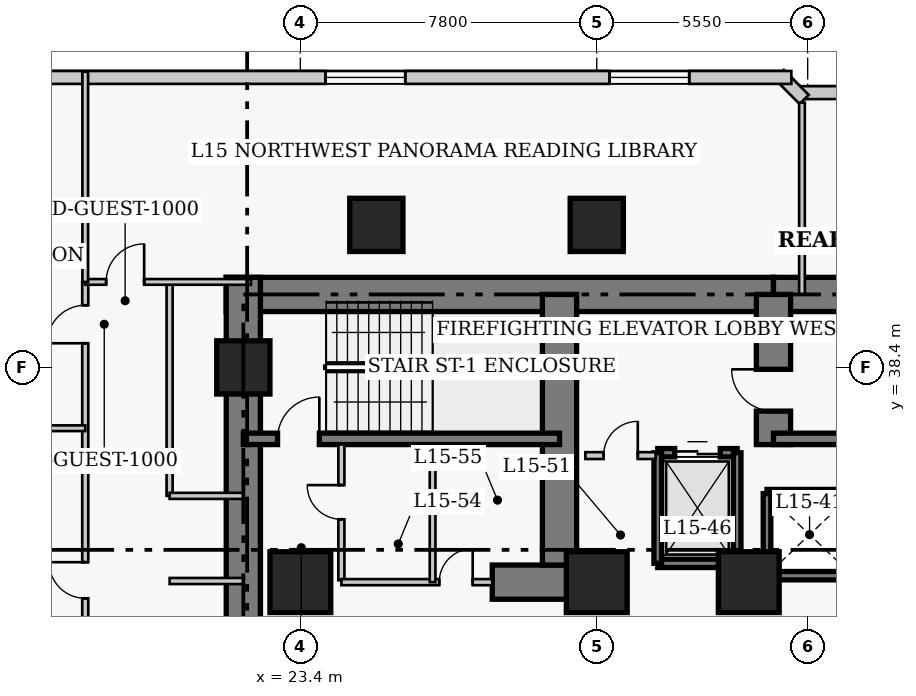
"""IFC4 building model, lengths in metres.
Left out: names, types, materials, properties, quantities, classifications, styles, units other than length and angle.
Written with IfcOpenShell. Run it as: python <this file> out.ifc"""

import sys

from ifc_helpers import new_model, si_unit, direction, frame, frame_2d, origin, origin_2d, place, context, subcontext, project, spatial, rectangle, extrude, element, fill, save


model = new_model("IFC4")
c1 = context("Model", 3, precision=1e-05, world=origin(), true_north=direction((0.0, 1.0)))
c2 = subcontext(c1, "Body", "Model", "MODEL_VIEW")
j1 = project(units=[si_unit("LENGTHUNIT", "METRE"), si_unit("PLANEANGLEUNIT", "RADIAN")], contexts=[c1])
p1 = place(None, origin())
s1 = spatial("IfcSite", under=j1, at=p1, CompositionType="ELEMENT")
p2 = place(p1, origin())
s2 = spatial("IfcBuilding", under=s1, at=p2, CompositionType="ELEMENT")
p3 = place(p2, frame((0.0, 0.0, 64.0)))
s3 = spatial("IfcBuildingStorey", under=s2, at=p3, CompositionType="ELEMENT", Elevation=64.0)
p4 = place(p3, frame((21.45, 40.32, 0.0), z_axis=(0.0, 0.0, 1.0), x_axis=(1.0, 0.0, 0.0)))
e1 = element("IfcWall", 1, at=p4, inside=s3, PredefinedType="SHEAR", context=c2, shape_type="SweptSolid", body=[
    extrude(rectangle(XDim=14.4, YDim=0.9, at=frame_2d((7.2, 0.0))), origin(), (0.0, 0.0, 1.0), 3.8),
])
p5 = place(p3, frame((35.85, 40.32, 0.0), z_axis=(0.0, 0.0, 1.0), x_axis=(1.0, 0.0, 0.0)))
e2 = element("IfcWall", 2, at=p5, inside=s3, PredefinedType="SHEAR", context=c2, shape_type="SweptSolid", body=[
    extrude(rectangle(XDim=12.6, YDim=0.9, at=frame_2d((6.3, 0.0))), origin(), (0.0, 0.0, 1.0), 3.8),
])
p6 = place(p3, frame((21.9, 27.05, 0.0), z_axis=(0.0, 0.0, 1.0), x_axis=(0.0, 1.0, 0.0)))
e3 = element("IfcWall", 3, at=p6, inside=s3, PredefinedType="SHEAR", context=c2, shape_type="SweptSolid", body=[
    extrude(rectangle(XDim=13.72, YDim=0.9, at=frame_2d((6.86, 0.0))), origin(), (0.0, 0.0, 1.0), 3.8),
])
p7 = place(p3, frame((28.45, 32.75, 0.0), z_axis=(0.0, 0.0, 1.0), x_axis=(1.0, 0.0, 0.0)))
e4 = element("IfcWall", 4, at=p7, inside=s3, PredefinedType="SHEAR", context=c2, shape_type="SweptSolid", body=[
    extrude(rectangle(XDim=2.4, YDim=0.9, at=frame_2d((1.2, 0.0))), origin(), (0.0, 0.0, 1.0), 3.8),
])
p8 = place(p3, frame((30.22, 33.2, 0.0), z_axis=(0.0, 0.0, 1.0), x_axis=(0.0, 1.0, 0.0)))
e5 = element("IfcWall", 5, at=p8, inside=s3, PredefinedType="SHEAR", context=c2, shape_type="SweptSolid", body=[
    extrude(rectangle(XDim=7.12, YDim=0.9, at=frame_2d((3.56, 0.0))), origin(), (0.0, 0.0, 1.0), 3.8),
])
p9 = place(p3, frame((35.85, 36.37, 0.0), z_axis=(0.0, 0.0, 1.0), x_axis=(0.0, 1.0, 0.0)))
e6 = element("IfcWall", 6, at=p9, inside=s3, PredefinedType="SHEAR", context=c2, shape_type="SweptSolid", body=[
    extrude(rectangle(XDim=3.95, YDim=0.9, at=frame_2d((1.975, 0.0))), origin(), (0.0, 0.0, 1.0), 3.8),
])
p10 = place(p9, frame((0.88, 0.0, 0.0)))
e7 = element("IfcOpeningElement", 7, at=p10, cuts=e6, PredefinedType="OPENING", context=c2, shape_type="SweptSolid", body=[
    extrude(rectangle(XDim=1.1, YDim=2.15, at=frame_2d((0.55, 1.075))), frame((0.0, 0.46, 0.0), z_axis=(0.0, -1.0, 0.0), x_axis=(1.0, 0.0, 0.0)), (0.0, 0.0, 1.0), 0.92),
])
p11 = place(p3, frame((21.9, 36.52, 0.0), z_axis=(0.0, 0.0, 1.0), x_axis=(1.0, 0.0, 0.0)))
e8 = element("IfcWall", 8, at=p11, inside=s3, PredefinedType="SHEAR", context=c2, shape_type="SweptSolid", body=[
    extrude(rectangle(XDim=8.32, YDim=0.3, at=frame_2d((4.16, 0.0))), origin(), (0.0, 0.0, 1.0), 3.8),
])
p12 = place(p11, frame((0.9, 0.0, 0.0)))
e9 = element("IfcOpeningElement", 9, at=p12, cuts=e8, PredefinedType="OPENING", context=c2, shape_type="SweptSolid", body=[
    extrude(rectangle(XDim=1.1, YDim=2.15, at=frame_2d((0.55, 1.075))), frame((0.0, 0.16, 0.0), z_axis=(0.0, -1.0, 0.0), x_axis=(1.0, 0.0, 0.0)), (0.0, 0.0, 1.0), 0.32),
])
p13 = place(p3, frame((35.85, 36.52, 0.0), z_axis=(0.0, 0.0, 1.0), x_axis=(1.0, 0.0, 0.0)))
e10 = element("IfcWall", 10, at=p13, inside=s3, PredefinedType="SHEAR", context=c2, shape_type="SweptSolid", body=[
    extrude(rectangle(XDim=8.33, YDim=0.3, at=frame_2d((4.165, 0.0))), origin(), (0.0, 0.0, 1.0), 3.8),
])
p14 = place(p3, frame((21.9, 38.4, 0.0), z_axis=(0.0, 0.0, 1.0), x_axis=(1.0, 0.0, 0.0)))
e11 = element("IfcColumn", 11, at=p14, inside=s3, PredefinedType="COLUMN", context=c2, shape_type="SweptSolid", body=[
    extrude(rectangle(XDim=1.4, YDim=1.4, at=origin_2d()), origin(), (0.0, 0.0, 1.0), 3.8),
])
for number, where, z_axis, x_axis in (
    (12, (23.4, 32.75, 0.0), (0.0, 0.0, 1.0), (1.0, 0.0, 0.0)),
    (13, (31.2, 32.75, 0.0), (0.0, 0.0, 1.0), (1.0, 0.0, 0.0)),
    (14, (35.2, 32.75, 0.0), (0.0, 0.0, 1.0), (1.0, 0.0, 0.0)),
):
    element("IfcColumn", number, at=place(p3, frame(where, z_axis=z_axis, x_axis=x_axis)), inside=s3, PredefinedType="COLUMN", context=c2, shape_type="SweptSolid", body=[
        extrude(rectangle(XDim=1.6, YDim=1.6, at=origin_2d()), origin(), (0.0, 0.0, 1.0), 3.8),
    ])
for number, where, z_axis, x_axis in (
    (15, (25.4, 42.15, 0.0), (0.0, 0.0, 1.0), (1.0, 0.0, 0.0)),
    (16, (31.2, 42.15, 0.0), (0.0, 0.0, 1.0), (1.0, 0.0, 0.0)),
):
    element("IfcColumn", number, at=place(p3, frame(where, z_axis=z_axis, x_axis=x_axis)), inside=s3, PredefinedType="COLUMN", context=c2, shape_type="SweptSolid", body=[
        extrude(rectangle(XDim=1.4, YDim=1.4, at=origin_2d()), origin(), (0.0, 0.0, 1.0), 3.8),
    ])
p15 = place(p3, frame((41.42, 45.63, 0.0), z_axis=(0.0, 0.0, 1.0), x_axis=(-1.0, 0.0, 0.0)))
e17 = element("IfcWall", 17, at=p15, inside=s3, PredefinedType="SOLIDWALL", context=c2, shape_type="SweptSolid", body=[
    extrude(rectangle(XDim=4.84, YDim=0.34, at=frame_2d((2.42, 0.0))), origin(), (0.0, 0.0, 1.0), 3.54),
])
p16 = place(p15, frame((1.37, 0.0, 0.85)))
e18 = element("IfcOpeningElement", 18, at=p16, cuts=e17, PredefinedType="OPENING", context=c2, shape_type="SweptSolid", body=[
    extrude(rectangle(XDim=2.1, YDim=1.85, at=frame_2d((1.05, 0.925))), frame((0.0, 0.18, 0.0), z_axis=(0.0, -1.0, 0.0), x_axis=(1.0, 0.0, 0.0)), (0.0, 0.0, 1.0), 0.36),
])
p17 = place(p3, frame((36.658, 45.451, 0.0), z_axis=(0.0, 0.0, 1.0), x_axis=(-0.707106781187, 0.707106781187, 0.0)))
e19 = element("IfcWall", 19, at=p17, inside=s3, PredefinedType="SOLIDWALL", context=c2, shape_type="SweptSolid", body=[
    extrude(rectangle(XDim=0.929, YDim=0.34, at=frame_2d((0.464, 0.0))), origin(), (0.0, 0.0, 1.0), 3.54),
])
p18 = place(p3, frame((36.32, 46.03, 0.0), z_axis=(0.0, 0.0, 1.0), x_axis=(-1.0, 0.0, 0.0)))
e20 = element("IfcWall", 20, at=p18, inside=s3, PredefinedType="SOLIDWALL", context=c2, shape_type="SweptSolid", body=[
    extrude(rectangle(XDim=29.89, YDim=0.34, at=frame_2d((14.945, 0.0))), origin(), (0.0, 0.0, 1.0), 3.54),
])
p19 = place(p18, frame((2.686, 0.0, 0.85)))
e21 = element("IfcOpeningElement", 21, at=p19, cuts=e20, PredefinedType="OPENING", context=c2, shape_type="SweptSolid", body=[
    extrude(rectangle(XDim=2.1, YDim=1.85, at=frame_2d((1.05, 0.925))), frame((0.0, 0.18, 0.0), z_axis=(0.0, -1.0, 0.0), x_axis=(1.0, 0.0, 0.0)), (0.0, 0.0, 1.0), 0.36),
])
p20 = place(p18, frame((10.159, 0.0, 0.85)))
e22 = element("IfcOpeningElement", 22, at=p20, cuts=e20, PredefinedType="OPENING", context=c2, shape_type="SweptSolid", body=[
    extrude(rectangle(XDim=2.1, YDim=1.85, at=frame_2d((1.05, 0.925))), frame((0.0, 0.18, 0.0), z_axis=(0.0, -1.0, 0.0), x_axis=(1.0, 0.0, 0.0)), (0.0, 0.0, 1.0), 0.36),
])
p21 = place(p18, frame((25.104, 0.0, 0.85)))
e23 = element("IfcOpeningElement", 23, at=p21, cuts=e20, PredefinedType="OPENING", context=c2, shape_type="SweptSolid", body=[
    extrude(rectangle(XDim=2.1, YDim=1.85, at=frame_2d((1.05, 0.925))), frame((0.0, 0.18, 0.0), z_axis=(0.0, -1.0, 0.0), x_axis=(1.0, 0.0, 0.0)), (0.0, 0.0, 1.0), 0.36),
])
for number, where, z_axis, x_axis in (
    (24, (35.68, 35.08, 0.0), (0.0, 0.0, 1.0), (1.0, 0.0, 0.0)),
    (25, (35.68, 32.92, 0.0), (0.0, 0.0, 1.0), (1.0, 0.0, 0.0)),
):
    element("IfcWall", number, at=place(p3, frame(where, z_axis=z_axis, x_axis=x_axis)), inside=s3, PredefinedType="SHEAR", context=c2, shape_type="SweptSolid", body=[
        extrude(rectangle(XDim=2.32, YDim=0.22, at=frame_2d((1.16, 0.0))), origin(), (0.0, 0.0, 1.0), 3.8),
    ])
p22 = place(p3, frame((35.68, 32.92, 0.0), z_axis=(0.0, 0.0, 1.0), x_axis=(0.0, 1.0, 0.0)))
e26 = element("IfcWall", 26, at=p22, inside=s3, PredefinedType="SHEAR", context=c2, shape_type="SweptSolid", body=[
    extrude(rectangle(XDim=2.16, YDim=0.2, at=frame_2d((1.08, 0.0))), origin(), (0.0, 0.0, 1.0), 3.8),
])
p23 = place(p3, frame((32.805, 36.155, 0.0), z_axis=(0.0, 0.0, 1.0), x_axis=(1.0, 0.0, 0.0)))
e27 = element("IfcWall", 27, at=p23, inside=s3, PredefinedType="SHEAR", context=c2, shape_type="SweptSolid", body=[
    extrude(rectangle(XDim=2.09, YDim=0.22, at=frame_2d((1.045, 0.0))), origin(), (0.0, 0.0, 1.0), 3.8),
])
p24 = place(p23, frame((0.445, 0.0, 0.0)))
e28 = element("IfcOpeningElement", 28, at=p24, cuts=e27, PredefinedType="OPENING", context=c2, shape_type="SweptSolid", body=[
    extrude(rectangle(XDim=1.2, YDim=2.15, at=frame_2d((0.6, 1.075))), frame((0.0, 0.12, 0.0), z_axis=(0.0, -1.0, 0.0), x_axis=(1.0, 0.0, 0.0)), (0.0, 0.0, 1.0), 0.24),
])
p25 = place(p3, frame((32.805, 33.245, 0.0), z_axis=(0.0, 0.0, 1.0), x_axis=(1.0, 0.0, 0.0)))
e29 = element("IfcWall", 29, at=p25, inside=s3, PredefinedType="SHEAR", context=c2, shape_type="SweptSolid", body=[
    extrude(rectangle(XDim=2.09, YDim=0.22, at=frame_2d((1.045, 0.0))), origin(), (0.0, 0.0, 1.0), 3.8),
])
for number, where, z_axis, x_axis in (
    (30, (32.805, 33.245, 0.0), (0.0, 0.0, 1.0), (0.0, 1.0, 0.0)),
    (31, (34.895, 33.245, 0.0), (0.0, 0.0, 1.0), (0.0, 1.0, 0.0)),
):
    element("IfcWall", number, at=place(p3, frame(where, z_axis=z_axis, x_axis=x_axis)), inside=s3, PredefinedType="SHEAR", context=c2, shape_type="SweptSolid", body=[
        extrude(rectangle(XDim=2.91, YDim=0.2, at=frame_2d((1.455, 0.0))), origin(), (0.0, 0.0, 1.0), 3.8),
    ])
p26 = place(p3, frame((30.9, 36.08, 0.0), z_axis=(0.0, 0.0, 1.0), x_axis=(1.0, 0.0, 0.0)))
e32 = element("IfcWall", 32, at=p26, inside=s3, PredefinedType="PARTITIONING", context=c2, shape_type="SweptSolid", body=[
    extrude(rectangle(XDim=1.85, YDim=0.18, at=frame_2d((0.925, 0.0))), origin(), (0.0, 0.0, 1.0), 3.54),
])
p27 = place(p26, frame((0.48, 0.0, 0.0)))
e33 = element("IfcOpeningElement", 33, at=p27, cuts=e32, PredefinedType="OPENING", context=c2, shape_type="SweptSolid", body=[
    extrude(rectangle(XDim=0.9, YDim=2.15, at=frame_2d((0.45, 1.075))), frame((0.0, 0.1, 0.0), z_axis=(0.0, -1.0, 0.0), x_axis=(1.0, 0.0, 0.0)), (0.0, 0.0, 1.0), 0.2),
])
p28 = place(p3, frame((24.48, 32.8, 0.0), z_axis=(0.0, 0.0, 1.0), x_axis=(0.0, 1.0, 0.0)))
e34 = element("IfcWall", 34, at=p28, inside=s3, PredefinedType="PARTITIONING", context=c2, shape_type="SweptSolid", body=[
    extrude(rectangle(XDim=3.57, YDim=0.16, at=frame_2d((1.785, 0.0))), origin(), (0.0, 0.0, 1.0), 3.54),
])
p29 = place(p28, frame((1.604, 0.0, 0.0)))
e35 = element("IfcOpeningElement", 35, at=p29, cuts=e34, PredefinedType="OPENING", context=c2, shape_type="SweptSolid", body=[
    extrude(rectangle(XDim=0.9, YDim=2.1, at=frame_2d((0.45, 1.05))), frame((0.0, 0.09, 0.0), z_axis=(0.0, -1.0, 0.0), x_axis=(1.0, 0.0, 0.0)), (0.0, 0.0, 1.0), 0.18),
])
p30 = place(p3, frame((24.48, 32.75, 0.0), z_axis=(0.0, 0.0, 1.0), x_axis=(1.0, 0.0, 0.0)))
e36 = element("IfcWall", 36, at=p30, inside=s3, PredefinedType="PARTITIONING", context=c2, shape_type="SweptSolid", body=[
    extrude(rectangle(XDim=3.97, YDim=0.16, at=frame_2d((1.985, 0.0))), origin(), (0.0, 0.0, 1.0), 3.54),
])
p31 = place(p30, frame((2.575, 0.0, 0.0)))
e37 = element("IfcOpeningElement", 37, at=p31, cuts=e36, PredefinedType="OPENING", context=c2, shape_type="SweptSolid", body=[
    extrude(rectangle(XDim=0.88, YDim=2.05, at=frame_2d((0.44, 1.025))), frame((0.0, 0.09, 0.0), z_axis=(0.0, -1.0, 0.0), x_axis=(1.0, 0.0, 0.0)), (0.0, 0.0, 1.0), 0.18),
])
p32 = place(p3, frame((26.88, 32.75, 0.0), z_axis=(0.0, 0.0, 1.0), x_axis=(0.0, 1.0, 0.0)))
e38 = element("IfcWall", 38, at=p32, inside=s3, PredefinedType="PARTITIONING", context=c2, shape_type="SweptSolid", body=[
    extrude(rectangle(XDim=3.62, YDim=0.15, at=frame_2d((1.81, 0.0))), origin(), (0.0, 0.0, 1.0), 3.54),
])
p33 = place(p3, frame((17.74, 5.05, 0.0), z_axis=(0.0, 0.0, 1.0), x_axis=(0.0, 1.0, 0.0)))
e39 = element("IfcWall", 39, at=p33, inside=s3, PredefinedType="PARTITIONING", context=c2, shape_type="SweptSolid", body=[
    extrude(rectangle(XDim=35.6, YDim=0.16, at=frame_2d((17.8, 0.0))), origin(), (0.0, 0.0, 1.0), 3.54),
])
p34 = place(p33, frame((2.6, 0.0, 0.0)))
e40 = element("IfcOpeningElement", 40, at=p34, cuts=e39, PredefinedType="OPENING", context=c2, shape_type="SweptSolid", body=[
    extrude(rectangle(XDim=0.95, YDim=2.1, at=frame_2d((0.475, 1.05))), frame((0.0, 0.09, 0.0), z_axis=(0.0, -1.0, 0.0), x_axis=(1.0, 0.0, 0.0)), (0.0, 0.0, 1.0), 0.18),
])
p35 = place(p33, frame((10.075, 0.0, 0.0)))
e41 = element("IfcOpeningElement", 41, at=p35, cuts=e39, PredefinedType="OPENING", context=c2, shape_type="SweptSolid", body=[
    extrude(rectangle(XDim=0.95, YDim=2.1, at=frame_2d((0.475, 1.05))), frame((0.0, 0.09, 0.0), z_axis=(0.0, -1.0, 0.0), x_axis=(1.0, 0.0, 0.0)), (0.0, 0.0, 1.0), 0.18),
])
p36 = place(p33, frame((18.875, 0.0, 0.0)))
e42 = element("IfcOpeningElement", 42, at=p36, cuts=e39, PredefinedType="OPENING", context=c2, shape_type="SweptSolid", body=[
    extrude(rectangle(XDim=0.95, YDim=2.1, at=frame_2d((0.475, 1.05))), frame((0.0, 0.09, 0.0), z_axis=(0.0, -1.0, 0.0), x_axis=(1.0, 0.0, 0.0)), (0.0, 0.0, 1.0), 0.18),
])
p37 = place(p33, frame((27.275, 0.0, 0.0)))
e43 = element("IfcOpeningElement", 43, at=p37, cuts=e39, PredefinedType="OPENING", context=c2, shape_type="SweptSolid", body=[
    extrude(rectangle(XDim=0.95, YDim=2.1, at=frame_2d((0.475, 1.05))), frame((0.0, 0.09, 0.0), z_axis=(0.0, -1.0, 0.0), x_axis=(1.0, 0.0, 0.0)), (0.0, 0.0, 1.0), 0.18),
])
p38 = place(p33, frame((33.986, 0.0, 0.0)))
e44 = element("IfcOpeningElement", 44, at=p38, cuts=e39, PredefinedType="OPENING", context=c2, shape_type="SweptSolid", body=[
    extrude(rectangle(XDim=1.0, YDim=2.15, at=frame_2d((0.5, 1.075))), frame((0.0, 0.09, 0.0), z_axis=(0.0, -1.0, 0.0), x_axis=(1.0, 0.0, 0.0)), (0.0, 0.0, 1.0), 0.18),
])
p39 = place(p3, frame((19.96, 35.02, 0.0), z_axis=(0.0, 0.0, 1.0), x_axis=(0.0, 1.0, 0.0)))
e45 = element("IfcWall", 45, at=p39, inside=s3, PredefinedType="PARTITIONING", context=c2, shape_type="SweptSolid", body=[
    extrude(rectangle(XDim=5.63, YDim=0.16, at=frame_2d((2.815, 0.0))), origin(), (0.0, 0.0, 1.0), 3.54),
])
for number, where, z_axis, x_axis in (
    (46, (19.96, 35.02, 0.0), (0.0, 0.0, 1.0), (1.0, 0.0, 0.0)),
    (47, (19.96, 32.78, 0.0), (0.0, 0.0, 1.0), (1.0, 0.0, 0.0)),
):
    element("IfcWall", number, at=place(p3, frame(where, z_axis=z_axis, x_axis=x_axis)), inside=s3, PredefinedType="PARTITIONING", context=c2, shape_type="SweptSolid", body=[
        extrude(rectangle(XDim=1.94, YDim=0.16, at=frame_2d((0.97, 0.0))), origin(), (0.0, 0.0, 1.0), 3.54),
    ])
p40 = place(p3, frame((17.74, 40.65, 0.0), z_axis=(0.0, 0.0, 1.0), x_axis=(1.0, 0.0, 0.0)))
e48 = element("IfcWall", 48, at=p40, inside=s3, PredefinedType="PARTITIONING", context=c2, shape_type="SweptSolid", body=[
    extrude(rectangle(XDim=4.36, YDim=0.15, at=frame_2d((2.18, 0.0))), origin(), (0.0, 0.0, 1.0), 3.54),
])
p41 = place(p40, frame((0.55, 0.0, 0.0)))
e49 = element("IfcOpeningElement", 49, at=p41, cuts=e48, PredefinedType="OPENING", context=c2, shape_type="SweptSolid", body=[
    extrude(rectangle(XDim=1.0, YDim=2.15, at=frame_2d((0.5, 1.075))), frame((0.0, 0.085, 0.0), z_axis=(0.0, -1.0, 0.0), x_axis=(1.0, 0.0, 0.0)), (0.0, 0.0, 1.0), 0.17),
])
p42 = place(p3, frame((17.74, 40.65, 0.0), z_axis=(0.0, 0.0, 1.0), x_axis=(0.0, 1.0, 0.0)))
e50 = element("IfcWall", 50, at=p42, inside=s3, PredefinedType="PARTITIONING", context=c2, shape_type="SweptSolid", body=[
    extrude(rectangle(XDim=5.53, YDim=0.15, at=frame_2d((2.765, 0.0))), origin(), (0.0, 0.0, 1.0), 3.54),
])
p43 = place(p3, frame((36.6, 40.32, 0.0), z_axis=(0.0, 0.0, 1.0), x_axis=(0.0, 1.0, 0.0)))
e51 = element("IfcWall", 51, at=p43, inside=s3, PredefinedType="PARTITIONING", context=c2, shape_type="SweptSolid", body=[
    extrude(rectangle(XDim=5.045, YDim=0.15, at=frame_2d((2.522, 0.0))), origin(), (0.0, 0.0, 1.0), 3.54),
])
p44 = place(p3, frame((14.45, 36.8, 0.0), z_axis=(0.0, 0.0, 1.0), x_axis=(1.0, 0.0, 0.0)))
e52 = element("IfcWall", 52, at=p44, inside=s3, PredefinedType="PARTITIONING", context=c2, shape_type="SweptSolid", body=[
    extrude(rectangle(XDim=3.29, YDim=0.15, at=frame_2d((1.645, 0.0))), origin(), (0.0, 0.0, 1.0), 3.54),
])
p45 = place(p19, origin())
e53 = element("IfcWindow", 53, at=p45, inside=s3, PartitioningType="SINGLE_PANEL", PredefinedType="WINDOW", context=c2, shape_type="SweptSolid", body=[
    extrude(rectangle(XDim=2.1, YDim=1.85, at=frame_2d((1.05, 0.925))), frame((0.0, 0.03, 0.0), z_axis=(0.0, -1.0, 0.0), x_axis=(1.0, 0.0, 0.0)), (0.0, 0.0, 1.0), 0.06),
])
fill(e21, e53)
p46 = place(p20, origin())
e54 = element("IfcWindow", 54, at=p46, inside=s3, PartitioningType="SINGLE_PANEL", PredefinedType="WINDOW", context=c2, shape_type="SweptSolid", body=[
    extrude(rectangle(XDim=2.1, YDim=1.85, at=frame_2d((1.05, 0.925))), frame((0.0, 0.03, 0.0), z_axis=(0.0, -1.0, 0.0), x_axis=(1.0, 0.0, 0.0)), (0.0, 0.0, 1.0), 0.06),
])
fill(e22, e54)
p47 = place(p24, origin())
e55 = element("IfcDoor", 55, at=p47, inside=s3, OperationType="DOUBLE_DOOR_SLIDING", PredefinedType="DOOR", context=c2, shape_type="SweptSolid", body=[
    extrude(rectangle(XDim=1.2, YDim=2.15, at=frame_2d((0.6, 1.075))), frame((0.0, 0.025, 0.0), z_axis=(0.0, -1.0, 0.0), x_axis=(1.0, 0.0, 0.0)), (0.0, 0.0, 1.0), 0.05),
])
fill(e28, e55)
p48 = place(p27, origin())
e56 = element("IfcDoor", 56, at=p48, inside=s3, OperationType="SINGLE_SWING_RIGHT", PredefinedType="DOOR", context=c2, shape_type="SweptSolid", body=[
    extrude(rectangle(XDim=0.9, YDim=2.15, at=frame_2d((0.45, 1.075))), frame((0.0, 0.025, 0.0), z_axis=(0.0, -1.0, 0.0), x_axis=(1.0, 0.0, 0.0)), (0.0, 0.0, 1.0), 0.05),
])
fill(e33, e56)
p49 = place(p29, origin())
e57 = element("IfcDoor", 57, at=p49, inside=s3, OperationType="SINGLE_SWING_RIGHT", PredefinedType="DOOR", context=c2, shape_type="SweptSolid", body=[
    extrude(rectangle(XDim=0.9, YDim=2.1, at=frame_2d((0.45, 1.05))), frame((0.0, 0.025, 0.0), z_axis=(0.0, -1.0, 0.0), x_axis=(1.0, 0.0, 0.0)), (0.0, 0.0, 1.0), 0.05),
])
fill(e35, e57)
p50 = place(p31, origin())
e58 = element("IfcDoor", 58, at=p50, inside=s3, OperationType="SINGLE_SWING_RIGHT", PredefinedType="DOOR", context=c2, shape_type="SweptSolid", body=[
    extrude(rectangle(XDim=0.88, YDim=2.05, at=frame_2d((0.44, 1.025))), frame((0.0, 0.025, 0.0), z_axis=(0.0, -1.0, 0.0), x_axis=(1.0, 0.0, 0.0)), (0.0, 0.0, 1.0), 0.05),
])
fill(e37, e58)
p51 = place(p41, origin())
e59 = element("IfcDoor", 59, at=p51, inside=s3, OperationType="SINGLE_SWING_RIGHT", PredefinedType="DOOR", context=c2, shape_type="SweptSolid", body=[
    extrude(rectangle(XDim=1.0, YDim=2.15, at=frame_2d((0.5, 1.075))), frame((0.0, 0.025, 0.0), z_axis=(0.0, -1.0, 0.0), x_axis=(1.0, 0.0, 0.0)), (0.0, 0.0, 1.0), 0.05),
])
fill(e49, e59)
p52 = place(p37, origin())
e60 = element("IfcDoor", 60, at=p52, inside=s3, OperationType="SINGLE_SWING_RIGHT", PredefinedType="DOOR", context=c2, shape_type="SweptSolid", body=[
    extrude(rectangle(XDim=0.95, YDim=2.1, at=frame_2d((0.475, 1.05))), frame((0.0, 0.025, 0.0), z_axis=(0.0, -1.0, 0.0), x_axis=(1.0, 0.0, 0.0)), (0.0, 0.0, 1.0), 0.05),
])
fill(e43, e60)
p53 = place(p38, origin())
e61 = element("IfcDoor", 61, at=p53, inside=s3, OperationType="SINGLE_SWING_LEFT", PredefinedType="DOOR", context=c2, shape_type="SweptSolid", body=[
    extrude(rectangle(XDim=1.0, YDim=2.15, at=frame_2d((0.5, 1.075))), frame((0.0, 0.025, 0.0), z_axis=(0.0, -1.0, 0.0), x_axis=(1.0, 0.0, 0.0)), (0.0, 0.0, 1.0), 0.05),
])
fill(e44, e61)
p54 = place(p12, origin())
e62 = element("IfcDoor", 62, at=p54, inside=s3, OperationType="SINGLE_SWING_RIGHT", PredefinedType="DOOR", context=c2, shape_type="SweptSolid", body=[
    extrude(rectangle(XDim=1.1, YDim=2.15, at=frame_2d((0.55, 1.075))), frame((0.0, 0.025, 0.0), z_axis=(0.0, -1.0, 0.0), x_axis=(1.0, 0.0, 0.0)), (0.0, 0.0, 1.0), 0.05),
])
fill(e9, e62)
p55 = place(p10, origin())
e63 = element("IfcDoor", 63, at=p55, inside=s3, OperationType="SINGLE_SWING_RIGHT", PredefinedType="DOOR", context=c2, shape_type="SweptSolid", body=[
    extrude(rectangle(XDim=1.1, YDim=2.15, at=frame_2d((0.55, 1.075))), frame((0.0, 0.025, 0.0), z_axis=(0.0, -1.0, 0.0), x_axis=(1.0, 0.0, 0.0)), (0.0, 0.0, 1.0), 0.05),
])
fill(e7, e63)
save(model, sys.argv[1])
